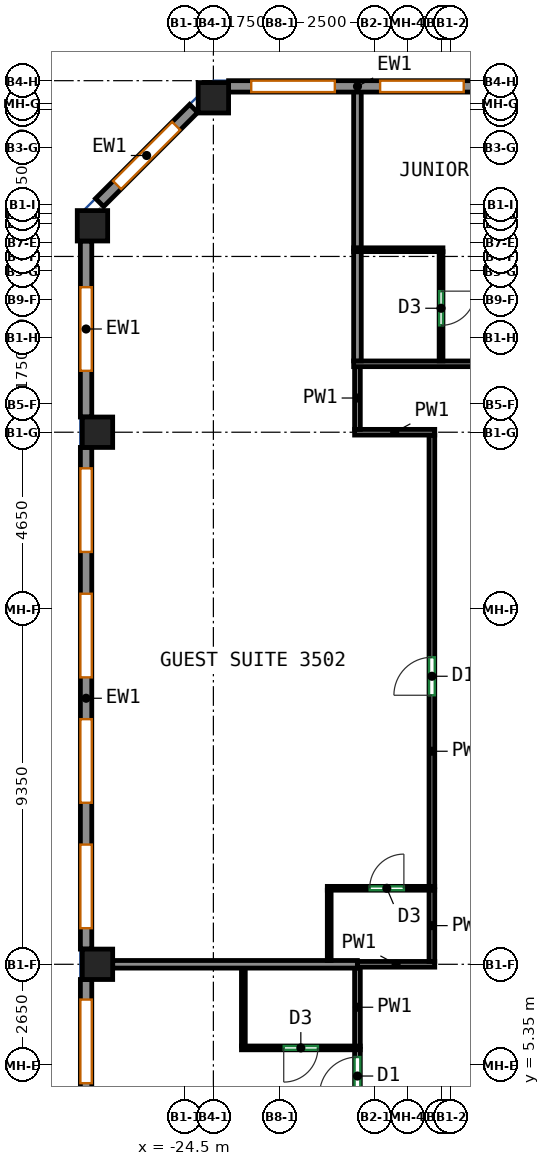
"""IFC4 building model, lengths in metres.
Left out: names, types, materials, properties, quantities, classifications, styles, units other than length and angle.
Written with IfcOpenShell. Run it as: python <this file> out.ifc"""

import sys

from ifc_helpers import new_model, si_unit, direction, frame, frame_2d, origin, origin_2d, place, context, subcontext, project, spatial, rectangle, extrude, source, transform, mapped, element, fill, save


model = new_model("IFC4")
c1 = context("Model", 3, precision=1e-05, world=origin(), true_north=direction((0.0, 1.0)))
c2 = subcontext(c1, "Body", "Model", "MODEL_VIEW")
j1 = project(units=[si_unit("LENGTHUNIT", "METRE"), si_unit("PLANEANGLEUNIT", "RADIAN")], contexts=[c1])
p1 = place(None, origin())
s1 = spatial("IfcSite", under=j1, at=p1, CompositionType="ELEMENT")
p2 = place(p1, origin())
s2 = spatial("IfcBuilding", under=s1, at=p2, CompositionType="ELEMENT")
p3 = place(p2, frame((0.0, 0.0, 154.1)))
s3 = spatial("IfcBuildingStorey", under=s2, at=p3, CompositionType="ELEMENT", Elevation=154.1)
m1 = source(origin(), c2, "Body", "SweptSolid", [
    extrude(rectangle(XDim=0.8, YDim=0.8, at=origin_2d()), origin(), (0.0, 0.0, 1.0), 3.12),
])
for number, where, z_axis, x_axis in (
    (1, (-26.932, 27.432, 0.0), (0.0, 0.0, 1.0), (1.0, 0.0, 0.0)),
    (2, (-26.8, 8.0, 0.0), (0.0, 0.0, 1.0), (1.0, 0.0, 0.0)),
    (3, (-26.8, 22.0, 0.0), (0.0, 0.0, 1.0), (1.0, 0.0, 0.0)),
    (4, (-23.75, 30.8, 0.0), (0.0, 0.0, 1.0), (1.0, 0.0, 0.0)),
):
    element("IfcColumn", number, at=place(p3, frame(where, z_axis=z_axis, x_axis=x_axis)), inside=s3, PredefinedType="COLUMN", context=c2, shape_type="MappedRepresentation", body=[
        mapped(m1, transform((0.0, 0.0, 0.0))),
    ])
m2 = source(origin(), c2, "Body", "SweptSolid", [
    extrude(rectangle(XDim=6.783, YDim=0.3, at=frame_2d((3.392, 0.0))), origin(), (0.0, 0.0, 1.0), 3.12),
])
p4 = place(p3, frame((-16.567, 31.1, 0.0), z_axis=(0.0, 0.0, 1.0), x_axis=(-1.0, 0.0, 0.0)))
e5 = element("IfcWall", 5, at=p4, inside=s3, PredefinedType="SOLIDWALL", context=c2, shape_type="MappedRepresentation", body=[
    mapped(m2, transform((0.0, 0.0, 0.0))),
])
p5 = place(p4, frame((0.596, 0.0, 0.85)))
e6 = element("IfcOpeningElement", 6, at=p5, cuts=e5, PredefinedType="OPENING", context=c2, shape_type="SweptSolid", body=[
    extrude(rectangle(XDim=2.2, YDim=1.95, at=frame_2d((1.1, 0.975))), frame((0.0, 0.16, 0.0), z_axis=(0.0, -1.0, 0.0), x_axis=(1.0, 0.0, 0.0)), (0.0, 0.0, 1.0), 0.32),
])
p6 = place(p4, frame((3.988, 0.0, 0.85)))
e7 = element("IfcOpeningElement", 7, at=p6, cuts=e5, PredefinedType="OPENING", context=c2, shape_type="SweptSolid", body=[
    extrude(rectangle(XDim=2.2, YDim=1.95, at=frame_2d((1.1, 0.975))), frame((0.0, 0.16, 0.0), z_axis=(0.0, -1.0, 0.0), x_axis=(1.0, 0.0, 0.0)), (0.0, 0.0, 1.0), 0.32),
])
m3 = source(origin(), c2, "Body", "SweptSolid", [
    extrude(rectangle(XDim=3.5, YDim=0.3, at=frame_2d((1.75, 0.0))), origin(), (0.0, 0.0, 1.0), 3.12),
])
p7 = place(p3, frame((-24.269, 30.519, 0.0), z_axis=(0.0, 0.0, 1.0), x_axis=(-0.707141656123, -0.70707190453, 0.0)))
e8 = element("IfcWall", 8, at=p7, inside=s3, PredefinedType="SOLIDWALL", context=c2, shape_type="MappedRepresentation", body=[
    mapped(m3, transform((0.0, 0.0, 0.0))),
])
p8 = place(p7, frame((0.65, 0.0, 0.85)))
e9 = element("IfcOpeningElement", 9, at=p8, cuts=e8, PredefinedType="OPENING", context=c2, shape_type="SweptSolid", body=[
    extrude(rectangle(XDim=2.2, YDim=1.95, at=frame_2d((1.1, 0.975))), frame((0.0, 0.16, 0.0), z_axis=(0.0, -1.0, 0.0), x_axis=(1.0, 0.0, 0.0)), (0.0, 0.0, 1.0), 0.32),
])
m4 = source(origin(), c2, "Body", "SweptSolid", [
    extrude(rectangle(XDim=4.632, YDim=0.3, at=frame_2d((2.316, 0.0))), origin(), (0.0, 0.0, 1.0), 3.12),
])
p9 = place(p3, frame((-27.1, 27.032, 0.0), z_axis=(0.0, 0.0, 1.0), x_axis=(0.0, -1.0, 0.0)))
e10 = element("IfcWall", 10, at=p9, inside=s3, PredefinedType="SOLIDWALL", context=c2, shape_type="MappedRepresentation", body=[
    mapped(m4, transform((0.0, 0.0, 0.0))),
])
p10 = place(p9, frame((1.216, 0.0, 0.85)))
e11 = element("IfcOpeningElement", 11, at=p10, cuts=e10, PredefinedType="OPENING", context=c2, shape_type="SweptSolid", body=[
    extrude(rectangle(XDim=2.2, YDim=1.95, at=frame_2d((1.1, 0.975))), frame((0.0, 0.16, 0.0), z_axis=(0.0, -1.0, 0.0), x_axis=(1.0, 0.0, 0.0)), (0.0, 0.0, 1.0), 0.32),
])
m5 = source(origin(), c2, "Body", "SweptSolid", [
    extrude(rectangle(XDim=13.2, YDim=0.3, at=frame_2d((6.6, 0.0))), origin(), (0.0, 0.0, 1.0), 3.12),
])
p11 = place(p3, frame((-27.1, 21.6, 0.0), z_axis=(0.0, 0.0, 1.0), x_axis=(0.0, -1.0, 0.0)))
e12 = element("IfcWall", 12, at=p11, inside=s3, PredefinedType="SOLIDWALL", context=c2, shape_type="MappedRepresentation", body=[
    mapped(m5, transform((0.0, 0.0, 0.0))),
])
p12 = place(p11, frame((0.55, 0.0, 0.85)))
e13 = element("IfcOpeningElement", 13, at=p12, cuts=e12, PredefinedType="OPENING", context=c2, shape_type="SweptSolid", body=[
    extrude(rectangle(XDim=2.2, YDim=1.95, at=frame_2d((1.1, 0.975))), frame((0.0, 0.16, 0.0), z_axis=(0.0, -1.0, 0.0), x_axis=(1.0, 0.0, 0.0)), (0.0, 0.0, 1.0), 0.32),
])
p13 = place(p11, frame((3.85, 0.0, 0.85)))
e14 = element("IfcOpeningElement", 14, at=p13, cuts=e12, PredefinedType="OPENING", context=c2, shape_type="SweptSolid", body=[
    extrude(rectangle(XDim=2.2, YDim=1.95, at=frame_2d((1.1, 0.975))), frame((0.0, 0.16, 0.0), z_axis=(0.0, -1.0, 0.0), x_axis=(1.0, 0.0, 0.0)), (0.0, 0.0, 1.0), 0.32),
])
p14 = place(p11, frame((7.15, 0.0, 0.85)))
e15 = element("IfcOpeningElement", 15, at=p14, cuts=e12, PredefinedType="OPENING", context=c2, shape_type="SweptSolid", body=[
    extrude(rectangle(XDim=2.2, YDim=1.95, at=frame_2d((1.1, 0.975))), frame((0.0, 0.16, 0.0), z_axis=(0.0, -1.0, 0.0), x_axis=(1.0, 0.0, 0.0)), (0.0, 0.0, 1.0), 0.32),
])
p15 = place(p11, frame((10.45, 0.0, 0.85)))
e16 = element("IfcOpeningElement", 16, at=p15, cuts=e12, PredefinedType="OPENING", context=c2, shape_type="SweptSolid", body=[
    extrude(rectangle(XDim=2.2, YDim=1.95, at=frame_2d((1.1, 0.975))), frame((0.0, 0.16, 0.0), z_axis=(0.0, -1.0, 0.0), x_axis=(1.0, 0.0, 0.0)), (0.0, 0.0, 1.0), 0.32),
])
m6 = source(origin(), c2, "Body", "SweptSolid", [
    extrude(rectangle(XDim=6.513, YDim=0.3, at=frame_2d((3.256, 0.0))), origin(), (0.0, 0.0, 1.0), 3.12),
])
p16 = place(p3, frame((-27.1, 7.6, 0.0), z_axis=(0.0, 0.0, 1.0), x_axis=(0.0, -1.0, 0.0)))
e17 = element("IfcWall", 17, at=p16, inside=s3, PredefinedType="SOLIDWALL", context=c2, shape_type="MappedRepresentation", body=[
    mapped(m6, transform((0.0, 0.0, 0.0))),
])
p17 = place(p16, frame((0.528, 0.0, 0.85)))
e18 = element("IfcOpeningElement", 18, at=p17, cuts=e17, PredefinedType="OPENING", context=c2, shape_type="SweptSolid", body=[
    extrude(rectangle(XDim=2.2, YDim=1.95, at=frame_2d((1.1, 0.975))), frame((0.0, 0.16, 0.0), z_axis=(0.0, -1.0, 0.0), x_axis=(1.0, 0.0, 0.0)), (0.0, 0.0, 1.0), 0.32),
])
p18 = place(p16, frame((3.784, 0.0, 0.85)))
e19 = element("IfcOpeningElement", 19, at=p18, cuts=e17, PredefinedType="OPENING", context=c2, shape_type="SweptSolid", body=[
    extrude(rectangle(XDim=2.2, YDim=1.95, at=frame_2d((1.1, 0.975))), frame((0.0, 0.16, 0.0), z_axis=(0.0, -1.0, 0.0), x_axis=(1.0, 0.0, 0.0)), (0.0, 0.0, 1.0), 0.32),
])
p19 = place(p3, frame((-19.959, 0.778, 0.0), z_axis=(0.0, 0.0, 1.0), x_axis=(0.0, 1.0, 0.0)))
e20 = element("IfcWall", 20, at=p19, inside=s3, PredefinedType="PARTITIONING", context=c2, shape_type="SweptSolid", body=[
    extrude(rectangle(XDim=4.982, YDim=0.15, at=frame_2d((2.491, 0.0))), origin(), (0.0, 0.0, 1.0), 3.12),
])
p20 = place(p19, frame((3.782, 0.0, 0.0)))
e21 = element("IfcOpeningElement", 21, at=p20, cuts=e20, PredefinedType="OPENING", context=c2, shape_type="SweptSolid", body=[
    extrude(rectangle(XDim=1.0, YDim=2.1, at=frame_2d((0.5, 1.05))), frame((0.0, 0.085, 0.0), z_axis=(0.0, -1.0, 0.0), x_axis=(1.0, 0.0, 0.0)), (0.0, 0.0, 1.0), 0.17),
])
p21 = place(p3, frame((-19.959, 5.84, 0.0), z_axis=(0.0, 0.0, 1.0), x_axis=(0.0, 1.0, 0.0)))
e22 = element("IfcWall", 22, at=p21, inside=s3, PredefinedType="PARTITIONING", context=c2, shape_type="SweptSolid", body=[
    extrude(rectangle(XDim=2.06, YDim=0.15, at=frame_2d((1.03, 0.0))), origin(), (0.0, 0.0, 1.0), 3.12),
])
p22 = place(p3, frame((-18.0, 10.04, 0.0), z_axis=(0.0, 0.0, 1.0), x_axis=(0.0, 1.0, 0.0)))
e23 = element("IfcWall", 23, at=p22, inside=s3, PredefinedType="PARTITIONING", context=c2, shape_type="SweptSolid", body=[
    extrude(rectangle(XDim=11.885, YDim=0.15, at=frame_2d((5.942, 0.0))), origin(), (0.0, 0.0, 1.0), 3.12),
])
p23 = place(p22, frame((5.039, 0.0, 0.0)))
e24 = element("IfcOpeningElement", 24, at=p23, cuts=e23, PredefinedType="OPENING", context=c2, shape_type="SweptSolid", body=[
    extrude(rectangle(XDim=1.0, YDim=2.1, at=frame_2d((0.5, 1.05))), frame((0.0, 0.085, 0.0), z_axis=(0.0, -1.0, 0.0), x_axis=(1.0, 0.0, 0.0)), (0.0, 0.0, 1.0), 0.17),
])
p24 = place(p3, frame((-20.034, 22.0, 0.0), z_axis=(0.0, 0.0, 1.0), x_axis=(1.0, 0.0, 0.0)))
e25 = element("IfcWall", 25, at=p24, inside=s3, PredefinedType="PARTITIONING", context=c2, shape_type="SweptSolid", body=[
    extrude(rectangle(XDim=2.109, YDim=0.15, at=frame_2d((1.054, 0.0))), origin(), (0.0, 0.0, 1.0), 3.12),
])
p25 = place(p3, frame((-19.959, 22.075, 0.0), z_axis=(0.0, 0.0, 1.0), x_axis=(0.0, 1.0, 0.0)))
e26 = element("IfcWall", 26, at=p25, inside=s3, PredefinedType="PARTITIONING", context=c2, shape_type="SweptSolid", body=[
    extrude(rectangle(XDim=1.65, YDim=0.15, at=frame_2d((0.825, 0.0))), origin(), (0.0, 0.0, 1.0), 3.12),
])
p26 = place(p3, frame((-17.925, 8.0, 0.0), z_axis=(0.0, 0.0, 1.0), x_axis=(-1.0, 0.0, 0.0)))
e27 = element("IfcWall", 27, at=p26, inside=s3, PredefinedType="PARTITIONING", context=c2, shape_type="SweptSolid", body=[
    extrude(rectangle(XDim=2.034, YDim=0.15, at=frame_2d((1.017, 0.0))), origin(), (0.0, 0.0, 1.0), 3.12),
])
p27 = place(p3, frame((-18.0, 8.075, 0.0), z_axis=(0.0, 0.0, 1.0), x_axis=(0.0, 1.0, 0.0)))
e28 = element("IfcWall", 28, at=p27, inside=s3, PredefinedType="PARTITIONING", context=c2, shape_type="SweptSolid", body=[
    extrude(rectangle(XDim=1.885, YDim=0.15, at=frame_2d((0.942, 0.0))), origin(), (0.0, 0.0, 1.0), 3.12),
])
p28 = place(p3, frame((-20.059, 23.8, 0.0), z_axis=(0.0, 0.0, 1.0), x_axis=(1.0, 0.0, 0.0)))
e29 = element("IfcWall", 29, at=p28, inside=s3, PredefinedType="PARTITIONING", context=c2, shape_type="SweptSolid", body=[
    extrude(rectangle(XDim=41.909, YDim=0.15, at=frame_2d((20.955, 0.0))), origin(), (0.0, 0.0, 1.0), 3.12),
])
p29 = place(p28, frame((5.293, 0.0, 0.0)))
e30 = element("IfcOpeningElement", 30, at=p29, cuts=e29, PredefinedType="OPENING", context=c2, shape_type="SweptSolid", body=[
    extrude(rectangle(XDim=1.0, YDim=2.1, at=frame_2d((0.5, 1.05))), frame((0.0, 0.085, 0.0), z_axis=(0.0, -1.0, 0.0), x_axis=(1.0, 0.0, 0.0)), (0.0, 0.0, 1.0), 0.17),
])
p30 = place(p28, frame((9.275, 0.0, 0.0)))
e31 = element("IfcOpeningElement", 31, at=p30, cuts=e29, PredefinedType="OPENING", context=c2, shape_type="SweptSolid", body=[
    extrude(rectangle(XDim=1.0, YDim=2.1, at=frame_2d((0.5, 1.05))), frame((0.0, 0.085, 0.0), z_axis=(0.0, -1.0, 0.0), x_axis=(1.0, 0.0, 0.0)), (0.0, 0.0, 1.0), 0.17),
])
p31 = place(p28, frame((18.292, 0.0, 0.0)))
e32 = element("IfcOpeningElement", 32, at=p31, cuts=e29, PredefinedType="OPENING", context=c2, shape_type="SweptSolid", body=[
    extrude(rectangle(XDim=1.0, YDim=2.1, at=frame_2d((0.5, 1.05))), frame((0.0, 0.085, 0.0), z_axis=(0.0, -1.0, 0.0), x_axis=(1.0, 0.0, 0.0)), (0.0, 0.0, 1.0), 0.17),
])
p32 = place(p28, frame((30.636, 0.0, 0.0)))
e33 = element("IfcOpeningElement", 33, at=p32, cuts=e29, PredefinedType="OPENING", context=c2, shape_type="SweptSolid", body=[
    extrude(rectangle(XDim=1.0, YDim=2.1, at=frame_2d((0.5, 1.05))), frame((0.0, 0.085, 0.0), z_axis=(0.0, -1.0, 0.0), x_axis=(1.0, 0.0, 0.0)), (0.0, 0.0, 1.0), 0.17),
])
p33 = place(p28, frame((36.828, 0.0, 0.0)))
e34 = element("IfcOpeningElement", 34, at=p33, cuts=e29, PredefinedType="OPENING", context=c2, shape_type="SweptSolid", body=[
    extrude(rectangle(XDim=1.0, YDim=2.1, at=frame_2d((0.5, 1.05))), frame((0.0, 0.085, 0.0), z_axis=(0.0, -1.0, 0.0), x_axis=(1.0, 0.0, 0.0)), (0.0, 0.0, 1.0), 0.17),
])
p34 = place(p28, frame((38.314, 0.0, 0.0)))
e35 = element("IfcOpeningElement", 35, at=p34, cuts=e29, PredefinedType="OPENING", context=c2, shape_type="SweptSolid", body=[
    extrude(rectangle(XDim=1.0, YDim=2.1, at=frame_2d((0.5, 1.05))), frame((0.0, 0.085, 0.0), z_axis=(0.0, -1.0, 0.0), x_axis=(1.0, 0.0, 0.0)), (0.0, 0.0, 1.0), 0.17),
])
p35 = place(p3, frame((-22.961, 5.85, 0.0), z_axis=(0.0, 0.0, 1.0), x_axis=(0.0, 1.0, 0.0)))
e36 = element("IfcWall", 36, at=p35, inside=s3, PredefinedType="PARTITIONING", context=c2, shape_type="SweptSolid", body=[
    extrude(rectangle(XDim=2.05, YDim=0.1, at=frame_2d((1.025, 0.0))), origin(), (0.0, 0.0, 1.0), 3.12),
])
p36 = place(p3, frame((-19.886, 5.8, 0.0), z_axis=(0.0, 0.0, 1.0), x_axis=(-1.0, 0.0, 0.0)))
e37 = element("IfcWall", 37, at=p36, inside=s3, PredefinedType="PARTITIONING", context=c2, shape_type="SweptSolid", body=[
    extrude(rectangle(XDim=3.125, YDim=0.1, at=frame_2d((1.562, 0.0))), origin(), (0.0, 0.0, 1.0), 3.12),
])
p37 = place(p36, frame((1.113, 0.0, 0.0)))
e38 = element("IfcOpeningElement", 38, at=p37, cuts=e37, PredefinedType="OPENING", context=c2, shape_type="SweptSolid", body=[
    extrude(rectangle(XDim=0.9, YDim=2.1, at=frame_2d((0.45, 1.05))), frame((0.0, 0.06, 0.0), z_axis=(0.0, -1.0, 0.0), x_axis=(1.0, 0.0, 0.0)), (0.0, 0.0, 1.0), 0.12),
])
p38 = place(p3, frame((-26.4, 8.0, 0.0), z_axis=(0.0, 0.0, 1.0), x_axis=(1.0, 0.0, 0.0)))
e39 = element("IfcWall", 39, at=p38, inside=s3, PredefinedType="PARTITIONING", context=c2, shape_type="SweptSolid", body=[
    extrude(rectangle(XDim=6.439, YDim=0.2, at=frame_2d((3.219, 0.0))), origin(), (0.0, 0.0, 1.0), 3.12),
])
p39 = place(p3, frame((-20.752, 10.0, 0.0), z_axis=(0.0, 0.0, 1.0), x_axis=(1.0, 0.0, 0.0)))
e40 = element("IfcWall", 40, at=p39, inside=s3, PredefinedType="PARTITIONING", context=c2, shape_type="SweptSolid", body=[
    extrude(rectangle(XDim=2.825, YDim=0.1, at=frame_2d((1.413, 0.0))), origin(), (0.0, 0.0, 1.0), 3.12),
])
p40 = place(p39, frame((1.115, 0.0, 0.0)))
e41 = element("IfcOpeningElement", 41, at=p40, cuts=e40, PredefinedType="OPENING", context=c2, shape_type="SweptSolid", body=[
    extrude(rectangle(XDim=0.9, YDim=2.1, at=frame_2d((0.45, 1.05))), frame((0.0, 0.06, 0.0), z_axis=(0.0, -1.0, 0.0), x_axis=(1.0, 0.0, 0.0)), (0.0, 0.0, 1.0), 0.12),
])
p41 = place(p3, frame((-20.702, 8.1, 0.0), z_axis=(0.0, 0.0, 1.0), x_axis=(0.0, 1.0, 0.0)))
e42 = element("IfcWall", 42, at=p41, inside=s3, PredefinedType="PARTITIONING", context=c2, shape_type="SweptSolid", body=[
    extrude(rectangle(XDim=1.85, YDim=0.1, at=frame_2d((0.925, 0.0))), origin(), (0.0, 0.0, 1.0), 3.12),
])
p42 = place(p3, frame((-19.959, 26.842, 0.0), z_axis=(0.0, 0.0, 1.0), x_axis=(0.0, 1.0, 0.0)))
e43 = element("IfcWall", 43, at=p42, inside=s3, PredefinedType="PARTITIONING", context=c2, shape_type="SweptSolid", body=[
    extrude(rectangle(XDim=4.158, YDim=0.2, at=frame_2d((2.079, 0.0))), origin(), (0.0, 0.0, 1.0), 3.12),
])
p43 = place(p3, frame((-19.959, 23.877, 0.0), z_axis=(0.0, 0.0, 1.0), x_axis=(0.0, 1.0, 0.0)))
e44 = element("IfcWall", 44, at=p43, inside=s3, PredefinedType="PARTITIONING", context=c2, shape_type="SweptSolid", body=[
    extrude(rectangle(XDim=2.885, YDim=0.2, at=frame_2d((1.442, 0.0))), origin(), (0.0, 0.0, 1.0), 3.12),
])
p44 = place(p3, frame((-17.759, 26.752, 0.0), z_axis=(0.0, 0.0, 1.0), x_axis=(0.0, -1.0, 0.0)))
e45 = element("IfcWall", 45, at=p44, inside=s3, PredefinedType="PARTITIONING", context=c2, shape_type="SweptSolid", body=[
    extrude(rectangle(XDim=2.875, YDim=0.1, at=frame_2d((1.438, 0.0))), origin(), (0.0, 0.0, 1.0), 3.12),
])
p45 = place(p44, frame((1.04, 0.0, 0.0)))
e46 = element("IfcOpeningElement", 46, at=p45, cuts=e45, PredefinedType="OPENING", context=c2, shape_type="SweptSolid", body=[
    extrude(rectangle(XDim=0.9, YDim=2.1, at=frame_2d((0.45, 1.05))), frame((0.0, 0.06, 0.0), z_axis=(0.0, -1.0, 0.0), x_axis=(1.0, 0.0, 0.0)), (0.0, 0.0, 1.0), 0.12),
])
p46 = place(p3, frame((-20.059, 26.802, 0.0), z_axis=(0.0, 0.0, 1.0), x_axis=(1.0, 0.0, 0.0)))
e47 = element("IfcWall", 47, at=p46, inside=s3, PredefinedType="PARTITIONING", context=c2, shape_type="SweptSolid", body=[
    extrude(rectangle(XDim=2.35, YDim=0.1, at=frame_2d((1.175, 0.0))), origin(), (0.0, 0.0, 1.0), 3.12),
])
p47 = place(p5, origin())
e48 = element("IfcWindow", 48, at=p47, inside=s3, PartitioningType="SINGLE_PANEL", PredefinedType="WINDOW", context=c2, shape_type="SweptSolid", body=[
    extrude(rectangle(XDim=2.2, YDim=1.95, at=frame_2d((1.1, 0.975))), frame((0.0, 0.03, 0.0), z_axis=(0.0, -1.0, 0.0), x_axis=(1.0, 0.0, 0.0)), (0.0, 0.0, 1.0), 0.06),
])
fill(e6, e48)
p48 = place(p6, origin())
e49 = element("IfcWindow", 49, at=p48, inside=s3, PartitioningType="SINGLE_PANEL", PredefinedType="WINDOW", context=c2, shape_type="SweptSolid", body=[
    extrude(rectangle(XDim=2.2, YDim=1.95, at=frame_2d((1.1, 0.975))), frame((0.0, 0.03, 0.0), z_axis=(0.0, -1.0, 0.0), x_axis=(1.0, 0.0, 0.0)), (0.0, 0.0, 1.0), 0.06),
])
fill(e7, e49)
p49 = place(p8, origin())
e50 = element("IfcWindow", 50, at=p49, inside=s3, PartitioningType="SINGLE_PANEL", PredefinedType="WINDOW", context=c2, shape_type="SweptSolid", body=[
    extrude(rectangle(XDim=2.2, YDim=1.95, at=frame_2d((1.1, 0.975))), frame((0.0, 0.03, 0.0), z_axis=(0.0, -1.0, 0.0), x_axis=(1.0, 0.0, 0.0)), (0.0, 0.0, 1.0), 0.06),
])
fill(e9, e50)
p50 = place(p10, origin())
e51 = element("IfcWindow", 51, at=p50, inside=s3, PartitioningType="SINGLE_PANEL", PredefinedType="WINDOW", context=c2, shape_type="SweptSolid", body=[
    extrude(rectangle(XDim=2.2, YDim=1.95, at=frame_2d((1.1, 0.975))), frame((0.0, 0.03, 0.0), z_axis=(0.0, -1.0, 0.0), x_axis=(1.0, 0.0, 0.0)), (0.0, 0.0, 1.0), 0.06),
])
fill(e11, e51)
p51 = place(p12, origin())
e52 = element("IfcWindow", 52, at=p51, inside=s3, PartitioningType="SINGLE_PANEL", PredefinedType="WINDOW", context=c2, shape_type="SweptSolid", body=[
    extrude(rectangle(XDim=2.2, YDim=1.95, at=frame_2d((1.1, 0.975))), frame((0.0, 0.03, 0.0), z_axis=(0.0, -1.0, 0.0), x_axis=(1.0, 0.0, 0.0)), (0.0, 0.0, 1.0), 0.06),
])
fill(e13, e52)
p52 = place(p13, origin())
e53 = element("IfcWindow", 53, at=p52, inside=s3, PartitioningType="SINGLE_PANEL", PredefinedType="WINDOW", context=c2, shape_type="SweptSolid", body=[
    extrude(rectangle(XDim=2.2, YDim=1.95, at=frame_2d((1.1, 0.975))), frame((0.0, 0.03, 0.0), z_axis=(0.0, -1.0, 0.0), x_axis=(1.0, 0.0, 0.0)), (0.0, 0.0, 1.0), 0.06),
])
fill(e14, e53)
p53 = place(p14, origin())
e54 = element("IfcWindow", 54, at=p53, inside=s3, PartitioningType="SINGLE_PANEL", PredefinedType="WINDOW", context=c2, shape_type="SweptSolid", body=[
    extrude(rectangle(XDim=2.2, YDim=1.95, at=frame_2d((1.1, 0.975))), frame((0.0, 0.03, 0.0), z_axis=(0.0, -1.0, 0.0), x_axis=(1.0, 0.0, 0.0)), (0.0, 0.0, 1.0), 0.06),
])
fill(e15, e54)
p54 = place(p15, origin())
e55 = element("IfcWindow", 55, at=p54, inside=s3, PartitioningType="SINGLE_PANEL", PredefinedType="WINDOW", context=c2, shape_type="SweptSolid", body=[
    extrude(rectangle(XDim=2.2, YDim=1.95, at=frame_2d((1.1, 0.975))), frame((0.0, 0.03, 0.0), z_axis=(0.0, -1.0, 0.0), x_axis=(1.0, 0.0, 0.0)), (0.0, 0.0, 1.0), 0.06),
])
fill(e16, e55)
p55 = place(p17, origin())
e56 = element("IfcWindow", 56, at=p55, inside=s3, PartitioningType="SINGLE_PANEL", PredefinedType="WINDOW", context=c2, shape_type="SweptSolid", body=[
    extrude(rectangle(XDim=2.2, YDim=1.95, at=frame_2d((1.1, 0.975))), frame((0.0, 0.03, 0.0), z_axis=(0.0, -1.0, 0.0), x_axis=(1.0, 0.0, 0.0)), (0.0, 0.0, 1.0), 0.06),
])
fill(e18, e56)
p56 = place(p20, origin())
e57 = element("IfcDoor", 57, at=p56, inside=s3, OperationType="SINGLE_SWING_LEFT", PredefinedType="DOOR", context=c2, shape_type="SweptSolid", body=[
    extrude(rectangle(XDim=1.0, YDim=2.1, at=frame_2d((0.5, 1.05))), frame((0.0, 0.025, 0.0), z_axis=(0.0, -1.0, 0.0), x_axis=(1.0, 0.0, 0.0)), (0.0, 0.0, 1.0), 0.05),
])
fill(e21, e57)
p57 = place(p37, origin())
e58 = element("IfcDoor", 58, at=p57, inside=s3, OperationType="SINGLE_SWING_RIGHT", PredefinedType="DOOR", context=c2, shape_type="SweptSolid", body=[
    extrude(rectangle(XDim=0.9, YDim=2.1, at=frame_2d((0.45, 1.05))), frame((0.0, 0.025, 0.0), z_axis=(0.0, -1.0, 0.0), x_axis=(1.0, 0.0, 0.0)), (0.0, 0.0, 1.0), 0.05),
])
fill(e38, e58)
p58 = place(p40, origin())
e59 = element("IfcDoor", 59, at=p58, inside=s3, OperationType="SINGLE_SWING_RIGHT", PredefinedType="DOOR", context=c2, shape_type="SweptSolid", body=[
    extrude(rectangle(XDim=0.9, YDim=2.1, at=frame_2d((0.45, 1.05))), frame((0.0, 0.025, 0.0), z_axis=(0.0, -1.0, 0.0), x_axis=(1.0, 0.0, 0.0)), (0.0, 0.0, 1.0), 0.05),
])
fill(e41, e59)
p59 = place(p23, origin())
e60 = element("IfcDoor", 60, at=p59, inside=s3, OperationType="SINGLE_SWING_LEFT", PredefinedType="DOOR", context=c2, shape_type="SweptSolid", body=[
    extrude(rectangle(XDim=1.0, YDim=2.1, at=frame_2d((0.5, 1.05))), frame((0.0, 0.025, 0.0), z_axis=(0.0, -1.0, 0.0), x_axis=(1.0, 0.0, 0.0)), (0.0, 0.0, 1.0), 0.05),
])
fill(e24, e60)
p60 = place(p45, origin())
e61 = element("IfcDoor", 61, at=p60, inside=s3, OperationType="SINGLE_SWING_LEFT", PredefinedType="DOOR", context=c2, shape_type="SweptSolid", body=[
    extrude(rectangle(XDim=0.9, YDim=2.1, at=frame_2d((0.45, 1.05))), frame((0.0, 0.025, 0.0), z_axis=(0.0, -1.0, 0.0), x_axis=(1.0, 0.0, 0.0)), (0.0, 0.0, 1.0), 0.05),
])
fill(e46, e61)
save(model, sys.argv[1])
